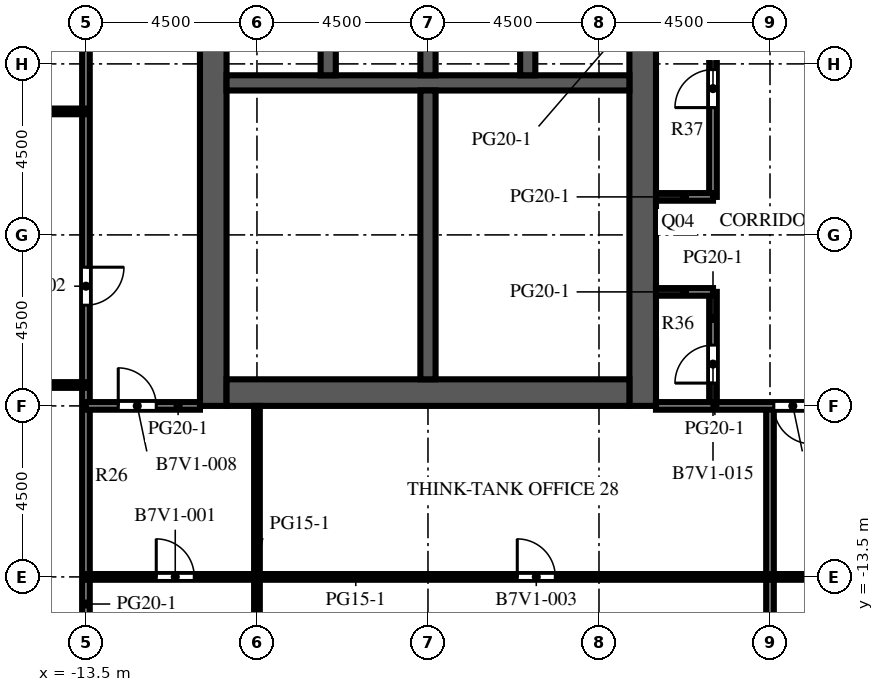
"""IFC4 building model, lengths in metres.
Left out: names, types, materials, properties, quantities, classifications, styles, units other than length and angle.
Written with IfcOpenShell. Run it as: python <this file> out.ifc"""

import sys

from ifc_helpers import new_model, si_unit, direction, frame, frame_2d, origin, place, context, subcontext, project, spatial, rectangle, extrude, element, fill, save


model = new_model("IFC4")
c1 = context("Model", 3, precision=1e-05, world=origin(), true_north=direction((0.0, 1.0)))
c2 = subcontext(c1, "Body", "Model", "MODEL_VIEW")
j1 = project(units=[si_unit("LENGTHUNIT", "METRE"), si_unit("PLANEANGLEUNIT", "RADIAN")], contexts=[c1])
p1 = place(None, origin())
s1 = spatial("IfcSite", under=j1, at=p1, CompositionType="ELEMENT")
p2 = place(p1, origin())
s2 = spatial("IfcBuilding", under=s1, at=p2, CompositionType="ELEMENT")
p3 = place(p2, frame((0.0, 0.0, 243.9)))
s3 = spatial("IfcBuildingStorey", under=s2, at=p3, CompositionType="ELEMENT", Elevation=243.9)
p4 = place(p3, frame((-10.15, -9.0, 0.0), z_axis=(0.0, 0.0, 1.0), x_axis=(0.0, 1.0, 0.0)))
e1 = element("IfcWall", 1, at=p4, inside=s3, PredefinedType="SHEAR", context=c2, shape_type="SweptSolid", body=[
    extrude(rectangle(XDim=27.5, YDim=0.7, at=frame_2d((13.75, 0.0))), origin(), (0.0, 0.0, 1.0), 4.1),
])
p5 = place(p4, frame((12.55, 0.0, 0.0)))
e2 = element("IfcOpeningElement", 2, at=p5, cuts=e1, PredefinedType="OPENING", context=c2, shape_type="SweptSolid", body=[
    extrude(rectangle(XDim=2.4, YDim=2.4, at=frame_2d((1.2, 1.2))), frame((0.0, 0.36, 0.0), z_axis=(0.0, -1.0, 0.0), x_axis=(1.0, 0.0, 0.0)), (0.0, 0.0, 1.0), 0.72),
])
p6 = place(p4, frame((6.825, 0.0, 0.0)))
e3 = element("IfcOpeningElement", 3, at=p6, cuts=e1, PredefinedType="OPENING", context=c2, shape_type="SweptSolid", body=[
    extrude(rectangle(XDim=1.2, YDim=2.1, at=frame_2d((0.6, 1.05))), frame((0.0, 0.36, 0.0), z_axis=(0.0, -1.0, 0.0), x_axis=(1.0, 0.0, 0.0)), (0.0, 0.0, 1.0), 0.72),
])
p7 = place(p4, frame((19.475, 0.0, 0.0)))
e4 = element("IfcOpeningElement", 4, at=p7, cuts=e1, PredefinedType="OPENING", context=c2, shape_type="SweptSolid", body=[
    extrude(rectangle(XDim=1.2, YDim=2.1, at=frame_2d((0.6, 1.05))), frame((0.0, 0.36, 0.0), z_axis=(0.0, -1.0, 0.0), x_axis=(1.0, 0.0, 0.0)), (0.0, 0.0, 1.0), 0.72),
])
p8 = place(p3, frame((1.15, -9.0, 0.0), z_axis=(0.0, 0.0, 1.0), x_axis=(0.0, 1.0, 0.0)))
e5 = element("IfcWall", 5, at=p8, inside=s3, PredefinedType="SHEAR", context=c2, shape_type="SweptSolid", body=[
    extrude(rectangle(XDim=27.5, YDim=0.7, at=frame_2d((13.75, 0.0))), origin(), (0.0, 0.0, 1.0), 4.1),
])
p9 = place(p8, frame((12.55, 0.0, 0.0)))
e6 = element("IfcOpeningElement", 6, at=p9, cuts=e5, PredefinedType="OPENING", context=c2, shape_type="SweptSolid", body=[
    extrude(rectangle(XDim=2.4, YDim=2.4, at=frame_2d((1.2, 1.2))), frame((0.0, 0.36, 0.0), z_axis=(0.0, -1.0, 0.0), x_axis=(1.0, 0.0, 0.0)), (0.0, 0.0, 1.0), 0.72),
])
p10 = place(p8, frame((3.9, 0.0, 0.0)))
e7 = element("IfcOpeningElement", 7, at=p10, cuts=e5, PredefinedType="OPENING", context=c2, shape_type="SweptSolid", body=[
    extrude(rectangle(XDim=1.2, YDim=2.1, at=frame_2d((0.6, 1.05))), frame((0.0, 0.36, 0.0), z_axis=(0.0, -1.0, 0.0), x_axis=(1.0, 0.0, 0.0)), (0.0, 0.0, 1.0), 0.72),
])
p11 = place(p8, frame((22.4, 0.0, 0.0)))
e8 = element("IfcOpeningElement", 8, at=p11, cuts=e5, PredefinedType="OPENING", context=c2, shape_type="SweptSolid", body=[
    extrude(rectangle(XDim=1.2, YDim=2.1, at=frame_2d((0.6, 1.05))), frame((0.0, 0.36, 0.0), z_axis=(0.0, -1.0, 0.0), x_axis=(1.0, 0.0, 0.0)), (0.0, 0.0, 1.0), 0.72),
])
p12 = place(p3, frame((-9.8, -8.65, 0.0), z_axis=(0.0, 0.0, 1.0), x_axis=(1.0, 0.0, 0.0)))
e9 = element("IfcWall", 9, at=p12, inside=s3, PredefinedType="SHEAR", context=c2, shape_type="SweptSolid", body=[
    extrude(rectangle(XDim=10.6, YDim=0.7, at=frame_2d((5.3, 0.0))), origin(), (0.0, 0.0, 1.0), 4.1),
])
p13 = place(p3, frame((-9.8, -0.5, 0.0), z_axis=(0.0, 0.0, 1.0), x_axis=(1.0, 0.0, 0.0)))
e10 = element("IfcWall", 10, at=p13, inside=s3, PredefinedType="SHEAR", context=c2, shape_type="SweptSolid", body=[
    extrude(rectangle(XDim=10.6, YDim=0.4, at=frame_2d((5.3, 0.0))), origin(), (0.0, 0.0, 1.0), 4.1),
])
for number, where, z_axis, x_axis in (
    (11, (-7.125, -0.3, 0.0), (0.0, 0.0, 1.0), (0.0, 1.0, 0.0)),
    (12, (-4.5, -0.3, 0.0), (0.0, 0.0, 1.0), (0.0, 1.0, 0.0)),
    (13, (-1.875, -0.3, 0.0), (0.0, 0.0, 1.0), (0.0, 1.0, 0.0)),
):
    element("IfcWall", number, at=place(p3, frame(where, z_axis=z_axis, x_axis=x_axis)), inside=s3, PredefinedType="SHEAR", context=c2, shape_type="SweptSolid", body=[
        extrude(rectangle(XDim=2.9, YDim=0.4, at=frame_2d((1.45, 0.0))), origin(), (0.0, 0.0, 1.0), 4.1),
    ])
p14 = place(p3, frame((-4.5, -8.3, 0.0), z_axis=(0.0, 0.0, 1.0), x_axis=(0.0, 1.0, 0.0)))
e14 = element("IfcWall", 14, at=p14, inside=s3, PredefinedType="SHEAR", context=c2, shape_type="SweptSolid", body=[
    extrude(rectangle(XDim=7.6, YDim=0.4, at=frame_2d((3.8, 0.0))), origin(), (0.0, 0.0, 1.0), 4.1),
])
p15 = place(p3, frame((-0.7, -8.3, 0.0), z_axis=(0.0, 0.0, 1.0), x_axis=(0.0, 1.0, 0.0)))
e15 = element("IfcWall", 15, at=p15, inside=s3, PredefinedType="PARTITIONING", context=c2, shape_type="SweptSolid", body=[
    extrude(rectangle(XDim=2.584, YDim=0.1, at=frame_2d((1.292, 0.0))), origin(), (0.0, 0.0, 1.0), 3.65),
])
p16 = place(p15, frame((0.792, 0.0, 0.0)))
e16 = element("IfcOpeningElement", 16, at=p16, cuts=e15, PredefinedType="OPENING", context=c2, shape_type="SweptSolid", body=[
    extrude(rectangle(XDim=1.0, YDim=2.1, at=frame_2d((0.5, 1.05))), frame((0.0, 0.06, 0.0), z_axis=(0.0, -1.0, 0.0), x_axis=(1.0, 0.0, 0.0)), (0.0, 0.0, 1.0), 0.12),
])
p17 = place(p3, frame((-0.7, -5.716, 0.0), z_axis=(0.0, 0.0, 1.0), x_axis=(0.0, 1.0, 0.0)))
e17 = element("IfcWall", 17, at=p17, inside=s3, PredefinedType="PARTITIONING", context=c2, shape_type="SweptSolid", body=[
    extrude(rectangle(XDim=2.128, YDim=0.1, at=frame_2d((1.064, 0.0))), origin(), (0.0, 0.0, 1.0), 3.65),
])
p18 = place(p17, frame((0.564, 0.0, 0.0)))
e18 = element("IfcOpeningElement", 18, at=p18, cuts=e17, PredefinedType="OPENING", context=c2, shape_type="SweptSolid", body=[
    extrude(rectangle(XDim=1.0, YDim=2.1, at=frame_2d((0.5, 1.05))), frame((0.0, 0.06, 0.0), z_axis=(0.0, -1.0, 0.0), x_axis=(1.0, 0.0, 0.0)), (0.0, 0.0, 1.0), 0.12),
])
p19 = place(p3, frame((-0.7, -3.588, 0.0), z_axis=(0.0, 0.0, 1.0), x_axis=(0.0, 1.0, 0.0)))
e19 = element("IfcWall", 19, at=p19, inside=s3, PredefinedType="PARTITIONING", context=c2, shape_type="SweptSolid", body=[
    extrude(rectangle(XDim=2.888, YDim=0.1, at=frame_2d((1.444, 0.0))), origin(), (0.0, 0.0, 1.0), 3.65),
])
p20 = place(p19, frame((0.944, 0.0, 0.0)))
e20 = element("IfcOpeningElement", 20, at=p20, cuts=e19, PredefinedType="OPENING", context=c2, shape_type="SweptSolid", body=[
    extrude(rectangle(XDim=1.0, YDim=2.1, at=frame_2d((0.5, 1.05))), frame((0.0, 0.06, 0.0), z_axis=(0.0, -1.0, 0.0), x_axis=(1.0, 0.0, 0.0)), (0.0, 0.0, 1.0), 0.12),
])
for number, where, z_axis, x_axis in (
    (21, (-4.3, -5.716, 0.0), (0.0, 0.0, 1.0), (1.0, 0.0, 0.0)),
    (22, (-4.3, -3.588, 0.0), (0.0, 0.0, 1.0), (1.0, 0.0, 0.0)),
):
    element("IfcWall", number, at=place(p3, frame(where, z_axis=z_axis, x_axis=x_axis)), inside=s3, PredefinedType="PARTITIONING", context=c2, shape_type="SweptSolid", body=[
        extrude(rectangle(XDim=3.6, YDim=0.1, at=frame_2d((1.8, 0.0))), origin(), (0.0, 0.0, 1.0), 3.65),
    ])
p21 = place(p3, frame((-13.5, -22.077, 0.0), z_axis=(0.0, 0.0, 1.0), x_axis=(0.0, 1.0, 0.0)))
e23 = element("IfcWall", 23, at=p21, inside=s3, PredefinedType="PARTITIONING", context=c2, shape_type="SweptSolid", body=[
    extrude(rectangle(XDim=25.327, YDim=0.2, at=frame_2d((12.664, 0.0))), origin(), (0.0, 0.0, 1.0), 3.65),
])
p22 = place(p21, frame((15.727, 0.0, 0.0)))
e24 = element("IfcOpeningElement", 24, at=p22, cuts=e23, PredefinedType="OPENING", context=c2, shape_type="SweptSolid", body=[
    extrude(rectangle(XDim=1.0, YDim=2.1, at=frame_2d((0.5, 1.05))), frame((0.0, 0.11, 0.0), z_axis=(0.0, -1.0, 0.0), x_axis=(1.0, 0.0, 0.0)), (0.0, 0.0, 1.0), 0.22),
])
p23 = place(p3, frame((-9.0, -17.5, 0.0), z_axis=(0.0, 0.0, 1.0), x_axis=(0.0, 1.0, 0.0)))
e25 = element("IfcWall", 25, at=p23, inside=s3, PredefinedType="PARTITIONING", context=c2, shape_type="SweptSolid", body=[
    extrude(rectangle(XDim=8.5, YDim=0.15, at=frame_2d((4.25, 0.0))), origin(), (0.0, 0.0, 1.0), 3.65),
])
p24 = place(p3, frame((3.0, -9.0, 0.0), z_axis=(0.0, 0.0, 1.0), x_axis=(0.0, 1.0, 0.0)))
e26 = element("IfcWall", 26, at=p24, inside=s3, PredefinedType="PARTITIONING", context=c2, shape_type="SweptSolid", body=[
    extrude(rectangle(XDim=3.0, YDim=0.2, at=frame_2d((1.5, 0.0))), origin(), (0.0, 0.0, 1.0), 3.65),
])
p25 = place(p24, frame((0.6, 0.0, 0.0)))
e27 = element("IfcOpeningElement", 27, at=p25, cuts=e26, PredefinedType="OPENING", context=c2, shape_type="SweptSolid", body=[
    extrude(rectangle(XDim=1.0, YDim=2.1, at=frame_2d((0.5, 1.05))), frame((0.0, 0.11, 0.0), z_axis=(0.0, -1.0, 0.0), x_axis=(1.0, 0.0, 0.0)), (0.0, 0.0, 1.0), 0.22),
])
p26 = place(p3, frame((3.0, -3.5, 0.0), z_axis=(0.0, 0.0, 1.0), x_axis=(0.0, 1.0, 0.0)))
e28 = element("IfcWall", 28, at=p26, inside=s3, PredefinedType="PARTITIONING", context=c2, shape_type="SweptSolid", body=[
    extrude(rectangle(XDim=6.3, YDim=0.2, at=frame_2d((3.15, 0.0))), origin(), (0.0, 0.0, 1.0), 3.65),
])
p27 = place(p26, frame((2.35, 0.0, 0.0)))
e29 = element("IfcOpeningElement", 29, at=p27, cuts=e28, PredefinedType="OPENING", context=c2, shape_type="SweptSolid", body=[
    extrude(rectangle(XDim=1.0, YDim=2.1, at=frame_2d((0.5, 1.05))), frame((0.0, 0.11, 0.0), z_axis=(0.0, -1.0, 0.0), x_axis=(1.0, 0.0, 0.0)), (0.0, 0.0, 1.0), 0.22),
])
p28 = place(p3, frame((4.5, -22.1, 0.0), z_axis=(0.0, 0.0, 1.0), x_axis=(0.0, 1.0, 0.0)))
e30 = element("IfcWall", 30, at=p28, inside=s3, PredefinedType="PARTITIONING", context=c2, shape_type="SweptSolid", body=[
    extrude(rectangle(XDim=13.1, YDim=0.2, at=frame_2d((6.55, 0.0))), origin(), (0.0, 0.0, 1.0), 3.65),
])
p29 = place(p3, frame((21.0, -13.5, 0.0), z_axis=(0.0, 0.0, 1.0), x_axis=(-1.0, 0.0, 0.0)))
e31 = element("IfcWall", 31, at=p29, inside=s3, PredefinedType="PARTITIONING", context=c2, shape_type="SweptSolid", body=[
    extrude(rectangle(XDim=34.5, YDim=0.15, at=frame_2d((17.25, 0.0))), origin(), (0.0, 0.0, 1.0), 3.65),
])
p30 = place(p29, frame((31.65, 0.0, 0.0)))
e32 = element("IfcOpeningElement", 32, at=p30, cuts=e31, PredefinedType="OPENING", context=c2, shape_type="SweptSolid", body=[
    extrude(rectangle(XDim=1.0, YDim=2.1, at=frame_2d((0.5, 1.05))), frame((0.0, 0.085, 0.0), z_axis=(0.0, -1.0, 0.0), x_axis=(1.0, 0.0, 0.0)), (0.0, 0.0, 1.0), 0.17),
])
p31 = place(p29, frame((22.15, 0.0, 0.0)))
e33 = element("IfcOpeningElement", 33, at=p31, cuts=e31, PredefinedType="OPENING", context=c2, shape_type="SweptSolid", body=[
    extrude(rectangle(XDim=1.0, YDim=2.1, at=frame_2d((0.5, 1.05))), frame((0.0, 0.085, 0.0), z_axis=(0.0, -1.0, 0.0), x_axis=(1.0, 0.0, 0.0)), (0.0, 0.0, 1.0), 0.17),
])
p32 = place(p29, frame((13.15, 0.0, 0.0)))
e34 = element("IfcOpeningElement", 34, at=p32, cuts=e31, PredefinedType="OPENING", context=c2, shape_type="SweptSolid", body=[
    extrude(rectangle(XDim=1.0, YDim=2.1, at=frame_2d((0.5, 1.05))), frame((0.0, 0.085, 0.0), z_axis=(0.0, -1.0, 0.0), x_axis=(1.0, 0.0, 0.0)), (0.0, 0.0, 1.0), 0.17),
])
p33 = place(p29, frame((6.15, 0.0, 0.0)))
e35 = element("IfcOpeningElement", 35, at=p33, cuts=e31, PredefinedType="OPENING", context=c2, shape_type="SweptSolid", body=[
    extrude(rectangle(XDim=1.0, YDim=2.1, at=frame_2d((0.5, 1.05))), frame((0.0, 0.085, 0.0), z_axis=(0.0, -1.0, 0.0), x_axis=(1.0, 0.0, 0.0)), (0.0, 0.0, 1.0), 0.17),
])
p34 = place(p3, frame((-10.5, -9.0, 0.0), z_axis=(0.0, 0.0, 1.0), x_axis=(-1.0, 0.0, 0.0)))
e36 = element("IfcWall", 36, at=p34, inside=s3, PredefinedType="PARTITIONING", context=c2, shape_type="SweptSolid", body=[
    extrude(rectangle(XDim=3.0, YDim=0.2, at=frame_2d((1.5, 0.0))), origin(), (0.0, 0.0, 1.0), 3.65),
])
p35 = place(p34, frame((1.15, 0.0, 0.0)))
e37 = element("IfcOpeningElement", 37, at=p35, cuts=e36, PredefinedType="OPENING", context=c2, shape_type="SweptSolid", body=[
    extrude(rectangle(XDim=1.0, YDim=2.1, at=frame_2d((0.5, 1.05))), frame((0.0, 0.11, 0.0), z_axis=(0.0, -1.0, 0.0), x_axis=(1.0, 0.0, 0.0)), (0.0, 0.0, 1.0), 0.22),
])
p36 = place(p3, frame((6.0, -9.0, 0.0), z_axis=(0.0, 0.0, 1.0), x_axis=(-1.0, 0.0, 0.0)))
e38 = element("IfcWall", 38, at=p36, inside=s3, PredefinedType="PARTITIONING", context=c2, shape_type="SweptSolid", body=[
    extrude(rectangle(XDim=4.5, YDim=0.2, at=frame_2d((2.25, 0.0))), origin(), (0.0, 0.0, 1.0), 3.65),
])
p37 = place(p36, frame((0.4, 0.0, 0.0)))
e39 = element("IfcOpeningElement", 39, at=p37, cuts=e38, PredefinedType="OPENING", context=c2, shape_type="SweptSolid", body=[
    extrude(rectangle(XDim=1.0, YDim=2.1, at=frame_2d((0.5, 1.05))), frame((0.0, 0.11, 0.0), z_axis=(0.0, -1.0, 0.0), x_axis=(1.0, 0.0, 0.0)), (0.0, 0.0, 1.0), 0.22),
])
p38 = place(p3, frame((-13.5, -8.45, 0.0), z_axis=(0.0, 0.0, 1.0), x_axis=(-1.0, 0.0, 0.0)))
e40 = element("IfcWall", 40, at=p38, inside=s3, PredefinedType="PARTITIONING", context=c2, shape_type="SweptSolid", body=[
    extrude(rectangle(XDim=4.35, YDim=0.15, at=frame_2d((2.175, 0.0))), origin(), (0.0, 0.0, 1.0), 3.65),
])
p39 = place(p38, frame((2.15, 0.0, 0.0)))
e41 = element("IfcOpeningElement", 41, at=p39, cuts=e40, PredefinedType="OPENING", context=c2, shape_type="SweptSolid", body=[
    extrude(rectangle(XDim=1.0, YDim=2.1, at=frame_2d((0.5, 1.05))), frame((0.0, 0.085, 0.0), z_axis=(0.0, -1.0, 0.0), x_axis=(1.0, 0.0, 0.0)), (0.0, 0.0, 1.0), 0.17),
])
for number, where, z_axis, x_axis in (
    (42, (1.5, -6.0, 0.0), (0.0, 0.0, 1.0), (1.0, 0.0, 0.0)),
    (43, (1.5, -3.5, 0.0), (0.0, 0.0, 1.0), (1.0, 0.0, 0.0)),
):
    element("IfcWall", number, at=place(p3, frame(where, z_axis=z_axis, x_axis=x_axis)), inside=s3, PredefinedType="PARTITIONING", context=c2, shape_type="SweptSolid", body=[
        extrude(rectangle(XDim=1.5, YDim=0.2, at=frame_2d((0.75, 0.0))), origin(), (0.0, 0.0, 1.0), 3.65),
    ])
p40 = place(p3, frame((-17.85, -1.25, 0.0), z_axis=(0.0, 0.0, 1.0), x_axis=(1.0, 0.0, 0.0)))
e44 = element("IfcWall", 44, at=p40, inside=s3, PredefinedType="PARTITIONING", context=c2, shape_type="SweptSolid", body=[
    extrude(rectangle(XDim=4.35, YDim=0.15, at=frame_2d((2.175, 0.0))), origin(), (0.0, 0.0, 1.0), 3.65),
])
p41 = place(p40, frame((1.7, 0.0, 0.0)))
e45 = element("IfcOpeningElement", 45, at=p41, cuts=e44, PredefinedType="OPENING", context=c2, shape_type="SweptSolid", body=[
    extrude(rectangle(XDim=1.0, YDim=2.1, at=frame_2d((0.5, 1.05))), frame((0.0, 0.085, 0.0), z_axis=(0.0, -1.0, 0.0), x_axis=(1.0, 0.0, 0.0)), (0.0, 0.0, 1.0), 0.17),
])
p42 = place(p6, origin())
e46 = element("IfcDoor", 46, at=p42, inside=s3, OperationType="SINGLE_SWING_LEFT", PredefinedType="DOOR", context=c2, shape_type="SweptSolid", body=[
    extrude(rectangle(XDim=1.2, YDim=2.1, at=frame_2d((0.6, 1.05))), frame((0.0, 0.025, 0.0), z_axis=(0.0, -1.0, 0.0), x_axis=(1.0, 0.0, 0.0)), (0.0, 0.0, 1.0), 0.05),
])
fill(e3, e46)
p43 = place(p10, origin())
e47 = element("IfcDoor", 47, at=p43, inside=s3, OperationType="SINGLE_SWING_LEFT", PredefinedType="DOOR", context=c2, shape_type="SweptSolid", body=[
    extrude(rectangle(XDim=1.2, YDim=2.1, at=frame_2d((0.6, 1.05))), frame((0.0, 0.325, 0.0), z_axis=(0.0, -1.0, 0.0), x_axis=(1.0, 0.0, 0.0)), (0.0, 0.0, 1.0), 0.05),
])
fill(e7, e47)
p44 = place(p16, origin())
e48 = element("IfcDoor", 48, at=p44, inside=s3, OperationType="SINGLE_SWING_RIGHT", PredefinedType="DOOR", context=c2, shape_type="SweptSolid", body=[
    extrude(rectangle(XDim=1.0, YDim=2.1, at=frame_2d((0.5, 1.05))), frame((0.0, 0.025, 0.0), z_axis=(0.0, -1.0, 0.0), x_axis=(1.0, 0.0, 0.0)), (0.0, 0.0, 1.0), 0.05),
])
fill(e16, e48)
p45 = place(p18, origin())
e49 = element("IfcDoor", 49, at=p45, inside=s3, OperationType="SINGLE_SWING_LEFT", PredefinedType="DOOR", context=c2, shape_type="SweptSolid", body=[
    extrude(rectangle(XDim=1.0, YDim=2.1, at=frame_2d((0.5, 1.05))), frame((0.0, 0.025, 0.0), z_axis=(0.0, -1.0, 0.0), x_axis=(1.0, 0.0, 0.0)), (0.0, 0.0, 1.0), 0.05),
])
fill(e18, e49)
p46 = place(p20, origin())
e50 = element("IfcDoor", 50, at=p46, inside=s3, OperationType="SINGLE_SWING_RIGHT", PredefinedType="DOOR", context=c2, shape_type="SweptSolid", body=[
    extrude(rectangle(XDim=1.0, YDim=2.1, at=frame_2d((0.5, 1.05))), frame((0.0, 0.025, 0.0), z_axis=(0.0, -1.0, 0.0), x_axis=(1.0, 0.0, 0.0)), (0.0, 0.0, 1.0), 0.05),
])
fill(e20, e50)
p47 = place(p30, origin())
e51 = element("IfcDoor", 51, at=p47, inside=s3, OperationType="SINGLE_SWING_RIGHT", PredefinedType="DOOR", context=c2, shape_type="SweptSolid", body=[
    extrude(rectangle(XDim=1.0, YDim=2.1, at=frame_2d((0.5, 1.05))), frame((0.0, 0.025, 0.0), z_axis=(0.0, -1.0, 0.0), x_axis=(1.0, 0.0, 0.0)), (0.0, 0.0, 1.0), 0.05),
])
fill(e32, e51)
p48 = place(p22, origin())
e52 = element("IfcDoor", 52, at=p48, inside=s3, OperationType="SINGLE_SWING_RIGHT", PredefinedType="DOOR", context=c2, shape_type="SweptSolid", body=[
    extrude(rectangle(XDim=1.0, YDim=2.1, at=frame_2d((0.5, 1.05))), frame((0.0, 0.025, 0.0), z_axis=(0.0, -1.0, 0.0), x_axis=(1.0, 0.0, 0.0)), (0.0, 0.0, 1.0), 0.05),
])
fill(e24, e52)
p49 = place(p31, origin())
e53 = element("IfcDoor", 53, at=p49, inside=s3, OperationType="SINGLE_SWING_RIGHT", PredefinedType="DOOR", context=c2, shape_type="SweptSolid", body=[
    extrude(rectangle(XDim=1.0, YDim=2.1, at=frame_2d((0.5, 1.05))), frame((0.0, 0.025, 0.0), z_axis=(0.0, -1.0, 0.0), x_axis=(1.0, 0.0, 0.0)), (0.0, 0.0, 1.0), 0.05),
])
fill(e33, e53)
p50 = place(p35, origin())
e54 = element("IfcDoor", 54, at=p50, inside=s3, OperationType="SINGLE_SWING_RIGHT", PredefinedType="DOOR", context=c2, shape_type="SweptSolid", body=[
    extrude(rectangle(XDim=1.0, YDim=2.1, at=frame_2d((0.5, 1.05))), frame((0.0, 0.025, 0.0), z_axis=(0.0, -1.0, 0.0), x_axis=(1.0, 0.0, 0.0)), (0.0, 0.0, 1.0), 0.05),
])
fill(e37, e54)
p51 = place(p37, origin())
e55 = element("IfcDoor", 55, at=p51, inside=s3, OperationType="SINGLE_SWING_LEFT", PredefinedType="DOOR", context=c2, shape_type="SweptSolid", body=[
    extrude(rectangle(XDim=1.0, YDim=2.1, at=frame_2d((0.5, 1.05))), frame((0.0, 0.025, 0.0), z_axis=(0.0, -1.0, 0.0), x_axis=(1.0, 0.0, 0.0)), (0.0, 0.0, 1.0), 0.05),
])
fill(e39, e55)
p52 = place(p25, origin())
e56 = element("IfcDoor", 56, at=p52, inside=s3, OperationType="SINGLE_SWING_LEFT", PredefinedType="DOOR", context=c2, shape_type="SweptSolid", body=[
    extrude(rectangle(XDim=1.0, YDim=2.1, at=frame_2d((0.5, 1.05))), frame((0.0, 0.025, 0.0), z_axis=(0.0, -1.0, 0.0), x_axis=(1.0, 0.0, 0.0)), (0.0, 0.0, 1.0), 0.05),
])
fill(e27, e56)
p53 = place(p27, origin())
e57 = element("IfcDoor", 57, at=p53, inside=s3, OperationType="SINGLE_SWING_LEFT", PredefinedType="DOOR", context=c2, shape_type="SweptSolid", body=[
    extrude(rectangle(XDim=1.0, YDim=2.1, at=frame_2d((0.5, 1.05))), frame((0.0, 0.025, 0.0), z_axis=(0.0, -1.0, 0.0), x_axis=(1.0, 0.0, 0.0)), (0.0, 0.0, 1.0), 0.05),
])
fill(e29, e57)
save(model, sys.argv[1])
